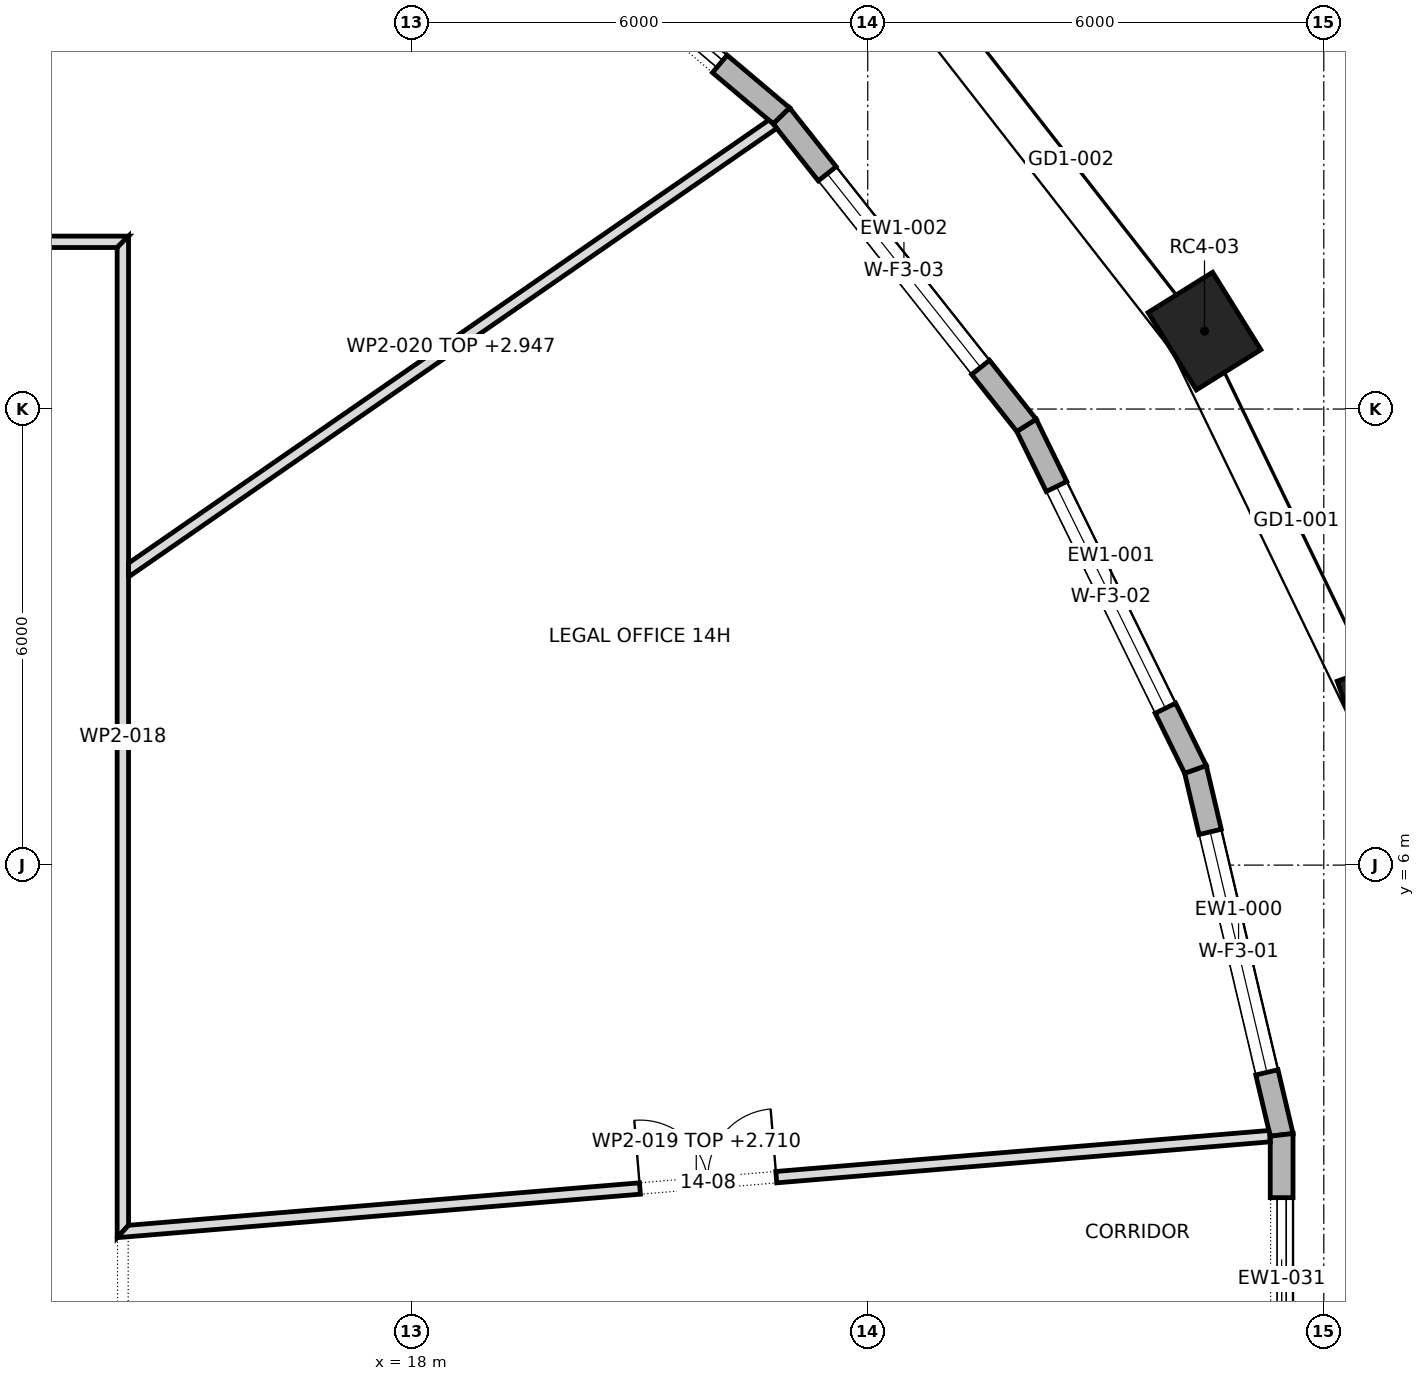
"""IFC4 building model, lengths in metres.
Left out: names, types, materials, properties, quantities, classifications, styles, units other than length and angle.
Written with IfcOpenShell. Run it as: python <this file> out.ifc"""

import sys

from ifc_helpers import new_model, si_unit, direction, frame, frame_2d, origin, origin_2d, place, context, subcontext, project, spatial, polyline, rectangle, outline, extrude, element, fill, save


model = new_model("IFC4")
c1 = context("Model", 3, precision=1e-05, world=origin(), true_north=direction((0.0, 1.0)))
c2 = subcontext(c1, "Body", "Model", "MODEL_VIEW")
j1 = project(units=[si_unit("LENGTHUNIT", "METRE"), si_unit("PLANEANGLEUNIT", "RADIAN")], contexts=[c1])
p1 = place(None, origin())
s1 = spatial("IfcSite", under=j1, at=p1, CompositionType="ELEMENT")
p2 = place(p1, origin())
s2 = spatial("IfcBuilding", under=s1, at=p2, CompositionType="ELEMENT")
p3 = place(p2, frame((0.0, 0.0, 202.9)))
s3 = spatial("IfcBuildingStorey", under=s2, at=p3, CompositionType="ELEMENT", Elevation=202.9)
for number, where, z_axis, x_axis in (
    (1, (30.849, 8.021, 0.0), (0.0, 0.0, 1.0), (-0.334, 0.943, 0.0)),
    (2, (28.43, 13.025, 0.0), (0.0, 0.0, 1.0), (-0.529, 0.849, 0.0)),
):
    element("IfcColumn", number, at=place(p3, frame(where, z_axis=z_axis, x_axis=x_axis)), inside=s3, PredefinedType="COLUMN", context=c2, shape_type="SweptSolid", body=[
        extrude(rectangle(XDim=1.2, YDim=1.0, at=origin_2d()), origin(), (0.0, 0.0, 1.0), 4.0),
    ])
p4 = place(p3, frame((29.445, 2.451, 0.0), z_axis=(0.0, 0.0, 1.0), x_axis=(-0.229535186351, 0.973300363828, 0.0)))
e3 = element("IfcWall", 3, at=p4, inside=s3, PredefinedType="STANDARD", context=c2, shape_type="SweptSolid", body=[
    extrude(outline(polyline([(-0.017, -0.15), (4.956, -0.15), (4.923, 0.15), (0.017, 0.15), (-0.017, -0.15)])), origin(), (0.0, 0.0, 1.0), 3.7),
])
p5 = place(p4, frame((0.845, 0.0, 0.6)))
e4 = element("IfcOpeningElement", 4, at=p5, cuts=e3, PredefinedType="OPENING", context=c2, shape_type="SweptSolid", body=[
    extrude(rectangle(XDim=3.25, YDim=2.65, at=frame_2d((1.625, 1.325))), frame((0.0, 0.162, 0.0), z_axis=(0.0, -1.0, 0.0), x_axis=(1.0, 0.0, 0.0)), (0.0, 0.0, 1.0), 0.324),
])
p6 = place(p3, frame((28.311, 7.259, 0.0), z_axis=(0.0, 0.0, 1.0), x_axis=(-0.440773193145, 0.89761851151, 0.0)))
e5 = element("IfcWall", 5, at=p6, inside=s3, PredefinedType="STANDARD", context=c2, shape_type="SweptSolid", body=[
    extrude(outline(polyline([(-0.017, -0.15), (5.059, -0.15), (5.027, 0.15), (0.017, 0.15), (-0.017, -0.15)])), origin(), (0.0, 0.0, 1.0), 3.7),
])
p7 = place(p6, frame((0.896, 0.0, 0.6)))
e6 = element("IfcOpeningElement", 6, at=p7, cuts=e5, PredefinedType="OPENING", context=c2, shape_type="SweptSolid", body=[
    extrude(rectangle(XDim=3.25, YDim=2.65, at=frame_2d((1.625, 1.325))), frame((0.0, 0.162, 0.0), z_axis=(0.0, -1.0, 0.0), x_axis=(1.0, 0.0, 0.0)), (0.0, 0.0, 1.0), 0.324),
])
p8 = place(p3, frame((26.088, 11.786, 0.0), z_axis=(0.0, 0.0, 1.0), x_axis=(-0.620870264345, 0.783913333763, 0.0)))
e7 = element("IfcWall", 7, at=p8, inside=s3, PredefinedType="STANDARD", context=c2, shape_type="SweptSolid", body=[
    extrude(outline(polyline([(-0.016, -0.15), (5.21, -0.15), (5.179, 0.15), (0.016, 0.15), (-0.016, -0.15)])), origin(), (0.0, 0.0, 1.0), 3.7),
])
p9 = place(p8, frame((0.972, 0.0, 0.6)))
e8 = element("IfcOpeningElement", 8, at=p9, cuts=e7, PredefinedType="OPENING", context=c2, shape_type="SweptSolid", body=[
    extrude(rectangle(XDim=3.25, YDim=2.65, at=frame_2d((1.625, 1.325))), frame((0.0, 0.162, 0.0), z_axis=(0.0, -1.0, 0.0), x_axis=(1.0, 0.0, 0.0)), (0.0, 0.0, 1.0), 0.324),
])
p10 = place(p3, frame((22.863, 15.858, 0.0), z_axis=(0.0, 0.0, 1.0), x_axis=(-0.764386053229, 0.6447588399, 0.0)))
e9 = element("IfcWall", 9, at=p10, inside=s3, PredefinedType="STANDARD", context=c2, shape_type="SweptSolid", body=[
    extrude(outline(polyline([(-0.015, -0.15), (5.382, -0.15), (5.353, 0.15), (0.015, 0.15), (-0.015, -0.15)])), origin(), (0.0, 0.0, 1.0), 3.7),
])
p11 = place(p10, frame((1.059, 0.0, 0.0)))
e10 = element("IfcOpeningElement", 10, at=p11, cuts=e9, PredefinedType="OPENING", context=c2, shape_type="SweptSolid", body=[
    extrude(rectangle(XDim=3.25, YDim=3.25, at=frame_2d((1.625, 1.625))), frame((0.0, 0.162, 0.0), z_axis=(0.0, -1.0, 0.0), x_axis=(1.0, 0.0, 0.0)), (0.0, 0.0, 1.0), 0.324),
])
p12 = place(p3, frame((29.445, -2.451, 0.0), z_axis=(0.0, 0.0, 1.0), x_axis=(0.0, 1.0, 0.0)))
e11 = element("IfcWall", 11, at=p12, inside=s3, PredefinedType="STANDARD", context=c2, shape_type="SweptSolid", body=[
    extrude(outline(polyline([(-0.017, -0.15), (4.92, -0.15), (4.885, 0.15), (0.017, 0.15), (-0.017, -0.15)])), origin(), (0.0, 0.0, 1.0), 3.7),
])
p13 = place(p12, frame((0.826, 0.0, 0.0)))
e12 = element("IfcOpeningElement", 12, at=p13, cuts=e11, PredefinedType="OPENING", context=c2, shape_type="SweptSolid", body=[
    extrude(rectangle(XDim=3.25, YDim=3.25, at=frame_2d((1.625, 1.625))), frame((0.0, 0.162, 0.0), z_axis=(0.0, -1.0, 0.0), x_axis=(1.0, 0.0, 0.0)), (0.0, 0.0, 1.0), 0.324),
])
p14 = place(p3, frame((1.576, 14.2, 0.0), z_axis=(0.0, 0.0, 1.0), x_axis=(1.0, 0.0, 0.0)))
e13 = element("IfcWall", 13, at=p14, inside=s3, PredefinedType="PARTITIONING", context=c2, shape_type="SweptSolid", body=[
    extrude(outline(polyline([(0.0, -0.075), (1.793, -0.075), (3.585, -0.075), (5.378, -0.075), (7.171, -0.075), (8.964, -0.075), (10.757, -0.075), (12.549, -0.075), (12.699, 0.075), (10.909, 0.075), (9.119, 0.075), (7.329, 0.075), (5.539, 0.075), (3.749, 0.075), (1.958, 0.075), (0.168, 0.075), (0.0, -0.075)])), origin(), (0.0, 0.0, 1.0), 3.7),
])
p15 = place(p14, frame((5.454, 0.0, 0.0)))
e14 = element("IfcOpeningElement", 14, at=p15, cuts=e13, PredefinedType="OPENING", context=c2, shape_type="SweptSolid", body=[
    extrude(rectangle(XDim=1.8, YDim=2.1, at=frame_2d((0.9, 1.05))), frame((0.0, 0.087, 0.0), z_axis=(0.0, -1.0, 0.0), x_axis=(1.0, 0.0, 0.0)), (0.0, 0.0, 1.0), 0.174),
])
p16 = place(p3, frame((14.2, 1.098, 0.0), z_axis=(0.0, 0.0, 1.0), x_axis=(0.0, 1.0, 0.0)))
e15 = element("IfcWall", 15, at=p16, inside=s3, PredefinedType="PARTITIONING", context=c2, shape_type="SweptSolid", body=[
    extrude(outline(polyline([(0.163, -0.075), (2.022, -0.075), (3.881, -0.075), (5.74, -0.075), (7.599, -0.075), (9.458, -0.075), (11.317, -0.075), (13.177, -0.075), (13.027, 0.075), (11.166, 0.075), (9.305, 0.075), (7.444, 0.075), (5.583, 0.075), (3.722, 0.075), (1.861, 0.075), (0.0, 0.075), (0.163, -0.075)])), origin(), (0.0, 0.0, 1.0), 3.7),
])
p17 = place(p3, frame((14.119, 1.173, 0.0), z_axis=(0.0, 0.0, 1.0), x_axis=(0.996562771728, 0.082841064731, 0.0)))
e16 = element("IfcWall", 16, at=p17, inside=s3, PredefinedType="PARTITIONING", context=c2, shape_type="SweptSolid", body=[
    extrude(outline(polyline([(15.222, -0.075), (15.222, 0.045), (15.217, 0.075), (13.335, 0.075), (11.454, 0.075), (9.572, 0.075), (7.69, 0.075), (5.808, 0.075), (3.926, 0.075), (2.044, 0.075), (0.163, 0.075), (0.081, 0.0), (0.0, -0.075), (0.0, -0.075), (1.903, -0.075), (3.805, -0.075), (5.708, -0.075), (7.611, -0.075), (9.514, -0.075), (11.416, -0.075), (13.319, -0.075), (15.222, -0.075)])), origin(), (0.0, 0.0, 1.0), 2.71),
])
p18 = place(p17, frame((6.908, 0.0, 0.0)))
e17 = element("IfcOpeningElement", 17, at=p18, cuts=e16, PredefinedType="OPENING", context=c2, shape_type="SweptSolid", body=[
    extrude(rectangle(XDim=1.8, YDim=2.1, at=frame_2d((0.9, 1.05))), frame((0.0, 0.087, 0.0), z_axis=(0.0, -1.0, 0.0), x_axis=(1.0, 0.0, 0.0)), (0.0, 0.0, 1.0), 0.174),
])
p19 = place(p3, frame((14.232, 9.853, 0.0), z_axis=(0.0, 0.0, 1.0), x_axis=(0.822298116352, 0.569056946047, 0.0)))
e18 = element("IfcWall", 18, at=p19, inside=s3, PredefinedType="PARTITIONING", context=c2, shape_type="SweptSolid", body=[
    extrude(outline(polyline([(10.37, -0.075), (10.37, -0.07), (10.366, 0.002), (10.346, 0.075), (8.639, 0.075), (6.932, 0.075), (5.225, 0.075), (3.518, 0.075), (1.811, 0.075), (0.104, 0.075), (0.0, -0.075), (0.0, -0.075), (1.729, -0.075), (3.457, -0.075), (5.185, -0.075), (6.914, -0.075), (8.642, -0.075), (10.37, -0.075)])), origin(), (0.0, 0.0, 1.0), 2.947),
])
p20 = place(p5, origin())
e19 = element("IfcWindow", 19, at=p20, inside=s3, PartitioningType="TRIPLE_PANEL_VERTICAL", PredefinedType="WINDOW", context=c2, shape_type="SweptSolid", body=[
    extrude(rectangle(XDim=3.25, YDim=2.65, at=frame_2d((1.625, 1.325))), frame((0.0, 0.03, 0.0), z_axis=(0.0, -1.0, 0.0), x_axis=(1.0, 0.0, 0.0)), (0.0, 0.0, 1.0), 0.06),
])
fill(e4, e19)
p21 = place(p7, origin())
e20 = element("IfcWindow", 20, at=p21, inside=s3, PartitioningType="TRIPLE_PANEL_VERTICAL", PredefinedType="WINDOW", context=c2, shape_type="SweptSolid", body=[
    extrude(rectangle(XDim=3.25, YDim=2.65, at=frame_2d((1.625, 1.325))), frame((0.0, 0.03, 0.0), z_axis=(0.0, -1.0, 0.0), x_axis=(1.0, 0.0, 0.0)), (0.0, 0.0, 1.0), 0.06),
])
fill(e6, e20)
p22 = place(p9, origin())
e21 = element("IfcWindow", 21, at=p22, inside=s3, PartitioningType="TRIPLE_PANEL_VERTICAL", PredefinedType="WINDOW", context=c2, shape_type="SweptSolid", body=[
    extrude(rectangle(XDim=3.25, YDim=2.65, at=frame_2d((1.625, 1.325))), frame((0.0, 0.03, 0.0), z_axis=(0.0, -1.0, 0.0), x_axis=(1.0, 0.0, 0.0)), (0.0, 0.0, 1.0), 0.06),
])
fill(e8, e21)
p23 = place(p11, origin())
e22 = element("IfcDoor", 22, at=p23, inside=s3, OperationType="DOUBLE_DOOR_SLIDING", PredefinedType="DOOR", context=c2, shape_type="SweptSolid", body=[
    extrude(rectangle(XDim=3.25, YDim=3.25, at=frame_2d((1.625, 1.625))), frame((0.0, 0.025, 0.0), z_axis=(0.0, -1.0, 0.0), x_axis=(1.0, 0.0, 0.0)), (0.0, 0.0, 1.0), 0.05),
])
fill(e10, e22)
p24 = place(p13, origin())
e23 = element("IfcDoor", 23, at=p24, inside=s3, OperationType="DOUBLE_DOOR_SLIDING", PredefinedType="DOOR", context=c2, shape_type="SweptSolid", body=[
    extrude(rectangle(XDim=3.25, YDim=3.25, at=frame_2d((1.625, 1.625))), frame((0.0, 0.025, 0.0), z_axis=(0.0, -1.0, 0.0), x_axis=(1.0, 0.0, 0.0)), (0.0, 0.0, 1.0), 0.05),
])
fill(e12, e23)
p25 = place(p18, origin())
e24 = element("IfcDoor", 24, at=p25, inside=s3, OperationType="DOUBLE_DOOR_SINGLE_SWING", PredefinedType="DOOR", context=c2, shape_type="SweptSolid", body=[
    extrude(rectangle(XDim=1.8, YDim=2.1, at=frame_2d((0.9, 1.05))), frame((0.0, 0.025, 0.0), z_axis=(0.0, -1.0, 0.0), x_axis=(1.0, 0.0, 0.0)), (0.0, 0.0, 1.0), 0.05),
])
fill(e17, e24)
save(model, sys.argv[1])
